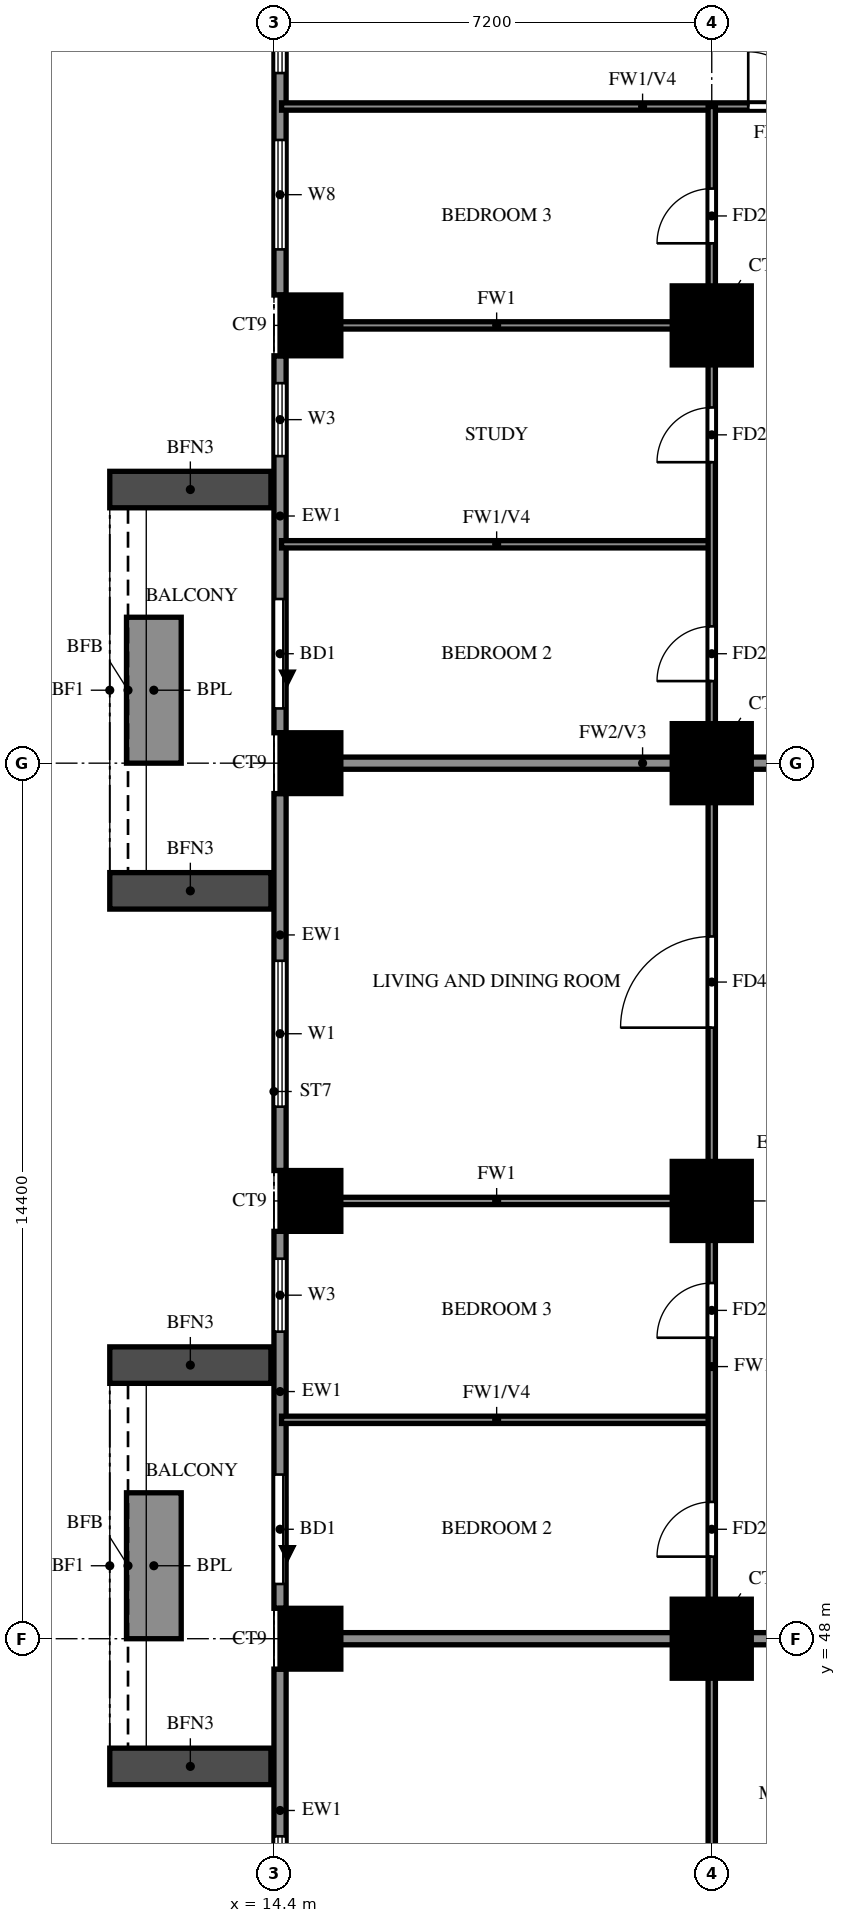
"""IFC4 building model, lengths in metres.
Left out: names, types, materials, properties, quantities, classifications, styles, units other than length and angle.
Written with IfcOpenShell. Run it as: python <this file> out.ifc"""

import sys

from ifc_helpers import new_model, si_unit, direction, frame, frame_2d, origin, origin_2d, place, context, subcontext, project, spatial, rectangle, extrude, source, transform, mapped, element, fill, save


model = new_model("IFC4")
c1 = context("Model", 3, precision=1e-05, world=origin(), true_north=direction((0.0, 1.0)))
c2 = subcontext(c1, "Body", "Model", "MODEL_VIEW")
j1 = project(units=[si_unit("LENGTHUNIT", "METRE"), si_unit("PLANEANGLEUNIT", "RADIAN")], contexts=[c1])
p1 = place(None, origin())
s1 = spatial("IfcSite", under=j1, at=p1, CompositionType="ELEMENT")
p2 = place(p1, origin())
s2 = spatial("IfcBuilding", under=s1, at=p2, CompositionType="ELEMENT")
p3 = place(p2, frame((0.0, 0.0, 62.0)))
s3 = spatial("IfcBuildingStorey", under=s2, at=p3, CompositionType="ELEMENT", Elevation=62.0)
m1 = source(origin(), c2, "Body", "SweptSolid", [
    extrude(rectangle(XDim=1.0, YDim=1.0, at=origin_2d()), origin(), (0.0, 0.0, 1.0), 3.18),
])
p4 = place(p3, frame((15.0, 48.0, 0.0), z_axis=(0.0, 0.0, 1.0), x_axis=(1.0, 0.0, 0.0)))
e1 = element("IfcColumn", 1, at=p4, inside=s3, PredefinedType="COLUMN", context=c2, shape_type="MappedRepresentation", body=[
    mapped(m1, transform((0.0, 0.0, 0.0))),
])
m2 = source(origin(), c2, "Body", "SweptSolid", [
    extrude(rectangle(XDim=1.3, YDim=1.3, at=origin_2d()), origin(), (0.0, 0.0, 1.0), 3.18),
])
p5 = place(p3, frame((21.6, 48.0, 0.0), z_axis=(0.0, 0.0, 1.0), x_axis=(1.0, 0.0, 0.0)))
e2 = element("IfcColumn", 2, at=p5, inside=s3, PredefinedType="COLUMN", context=c2, shape_type="MappedRepresentation", body=[
    mapped(m2, transform((0.0, 0.0, 0.0))),
])
p6 = place(p3, frame((15.0, 55.2, 0.0), z_axis=(0.0, 0.0, 1.0), x_axis=(1.0, 0.0, 0.0)))
e3 = element("IfcColumn", 3, at=p6, inside=s3, PredefinedType="COLUMN", context=c2, shape_type="MappedRepresentation", body=[
    mapped(m1, transform((0.0, 0.0, 0.0))),
])
p7 = place(p3, frame((21.6, 55.2, 0.0), z_axis=(0.0, 0.0, 1.0), x_axis=(1.0, 0.0, 0.0)))
e4 = element("IfcColumn", 4, at=p7, inside=s3, PredefinedType="COLUMN", context=c2, shape_type="MappedRepresentation", body=[
    mapped(m2, transform((0.0, 0.0, 0.0))),
])
p8 = place(p3, frame((15.0, 62.4, 0.0), z_axis=(0.0, 0.0, 1.0), x_axis=(1.0, 0.0, 0.0)))
e5 = element("IfcColumn", 5, at=p8, inside=s3, PredefinedType="COLUMN", context=c2, shape_type="MappedRepresentation", body=[
    mapped(m1, transform((0.0, 0.0, 0.0))),
])
p9 = place(p3, frame((21.6, 62.4, 0.0), z_axis=(0.0, 0.0, 1.0), x_axis=(1.0, 0.0, 0.0)))
e6 = element("IfcColumn", 6, at=p9, inside=s3, PredefinedType="COLUMN", context=c2, shape_type="MappedRepresentation", body=[
    mapped(m2, transform((0.0, 0.0, 0.0))),
])
p10 = place(p3, frame((15.0, 69.6, 0.0), z_axis=(0.0, 0.0, 1.0), x_axis=(1.0, 0.0, 0.0)))
e7 = element("IfcColumn", 7, at=p10, inside=s3, PredefinedType="COLUMN", context=c2, shape_type="MappedRepresentation", body=[
    mapped(m1, transform((0.0, 0.0, 0.0))),
])
p11 = place(p3, frame((21.6, 69.6, 0.0), z_axis=(0.0, 0.0, 1.0), x_axis=(1.0, 0.0, 0.0)))
e8 = element("IfcColumn", 8, at=p11, inside=s3, PredefinedType="COLUMN", context=c2, shape_type="MappedRepresentation", body=[
    mapped(m2, transform((0.0, 0.0, 0.0))),
])
p12 = place(p3, frame((14.5, 76.3, 0.0), z_axis=(0.0, 0.0, 1.0), x_axis=(0.0, -1.0, 0.0)))
e9 = element("IfcWall", 9, at=p12, inside=s3, PredefinedType="SOLIDWALL", context=c2, shape_type="SweptSolid", body=[
    extrude(rectangle(XDim=6.2, YDim=0.2, at=frame_2d((3.1, 0.0))), origin(), (0.0, 0.0, 1.0), 3.18),
])
p13 = place(p12, frame((3.65, 0.0, 0.6)))
e10 = element("IfcOpeningElement", 10, at=p13, cuts=e9, PredefinedType="OPENING", context=c2, shape_type="SweptSolid", body=[
    extrude(rectangle(XDim=1.8, YDim=2.4, at=frame_2d((0.9, 1.2))), frame((0.0, 0.11, 0.0), z_axis=(0.0, -1.0, 0.0), x_axis=(1.0, 0.0, 0.0)), (0.0, 0.0, 1.0), 0.22),
])
p14 = place(p12, frame((0.75, 0.0, 0.6)))
e11 = element("IfcOpeningElement", 11, at=p14, cuts=e9, PredefinedType="OPENING", context=c2, shape_type="SweptSolid", body=[
    extrude(rectangle(XDim=1.8, YDim=2.4, at=frame_2d((0.9, 1.2))), frame((0.0, 0.11, 0.0), z_axis=(0.0, -1.0, 0.0), x_axis=(1.0, 0.0, 0.0)), (0.0, 0.0, 1.0), 0.22),
])
p15 = place(p3, frame((14.5, 69.1, 0.0), z_axis=(0.0, 0.0, 1.0), x_axis=(0.0, -1.0, 0.0)))
e12 = element("IfcWall", 12, at=p15, inside=s3, PredefinedType="SOLIDWALL", context=c2, shape_type="SweptSolid", body=[
    extrude(rectangle(XDim=6.2, YDim=0.2, at=frame_2d((3.1, 0.0))), origin(), (0.0, 0.0, 1.0), 3.18),
])
p16 = place(p15, frame((4.0, 0.0, 0.0)))
e13 = element("IfcOpeningElement", 13, at=p16, cuts=e12, PredefinedType="OPENING", context=c2, shape_type="SweptSolid", body=[
    extrude(rectangle(XDim=1.8, YDim=2.4, at=frame_2d((0.9, 1.2))), frame((0.0, 0.11, 0.0), z_axis=(0.0, -1.0, 0.0), x_axis=(1.0, 0.0, 0.0)), (0.0, 0.0, 1.0), 0.22),
])
p17 = place(p15, frame((0.45, 0.0, 0.6)))
e14 = element("IfcOpeningElement", 14, at=p17, cuts=e12, PredefinedType="OPENING", context=c2, shape_type="SweptSolid", body=[
    extrude(rectangle(XDim=1.2, YDim=2.4, at=frame_2d((0.6, 1.2))), frame((0.0, 0.11, 0.0), z_axis=(0.0, -1.0, 0.0), x_axis=(1.0, 0.0, 0.0)), (0.0, 0.0, 1.0), 0.22),
])
p18 = place(p3, frame((14.5, 61.9, 0.0), z_axis=(0.0, 0.0, 1.0), x_axis=(0.0, -1.0, 0.0)))
e15 = element("IfcWall", 15, at=p18, inside=s3, PredefinedType="SOLIDWALL", context=c2, shape_type="SweptSolid", body=[
    extrude(rectangle(XDim=6.2, YDim=0.2, at=frame_2d((3.1, 0.0))), origin(), (0.0, 0.0, 1.0), 3.18),
])
p19 = place(p18, frame((2.75, 0.0, 0.6)))
e16 = element("IfcOpeningElement", 16, at=p19, cuts=e15, PredefinedType="OPENING", context=c2, shape_type="SweptSolid", body=[
    extrude(rectangle(XDim=2.4, YDim=2.4, at=frame_2d((1.2, 1.2))), frame((0.0, 0.11, 0.0), z_axis=(0.0, -1.0, 0.0), x_axis=(1.0, 0.0, 0.0)), (0.0, 0.0, 1.0), 0.22),
])
p20 = place(p3, frame((14.5, 54.7, 0.0), z_axis=(0.0, 0.0, 1.0), x_axis=(0.0, -1.0, 0.0)))
e17 = element("IfcWall", 17, at=p20, inside=s3, PredefinedType="SOLIDWALL", context=c2, shape_type="SweptSolid", body=[
    extrude(rectangle(XDim=6.2, YDim=0.2, at=frame_2d((3.1, 0.0))), origin(), (0.0, 0.0, 1.0), 3.18),
])
p21 = place(p20, frame((4.0, 0.0, 0.0)))
e18 = element("IfcOpeningElement", 18, at=p21, cuts=e17, PredefinedType="OPENING", context=c2, shape_type="SweptSolid", body=[
    extrude(rectangle(XDim=1.8, YDim=2.4, at=frame_2d((0.9, 1.2))), frame((0.0, 0.11, 0.0), z_axis=(0.0, -1.0, 0.0), x_axis=(1.0, 0.0, 0.0)), (0.0, 0.0, 1.0), 0.22),
])
p22 = place(p20, frame((0.45, 0.0, 0.6)))
e19 = element("IfcOpeningElement", 19, at=p22, cuts=e17, PredefinedType="OPENING", context=c2, shape_type="SweptSolid", body=[
    extrude(rectangle(XDim=1.2, YDim=2.4, at=frame_2d((0.6, 1.2))), frame((0.0, 0.11, 0.0), z_axis=(0.0, -1.0, 0.0), x_axis=(1.0, 0.0, 0.0)), (0.0, 0.0, 1.0), 0.22),
])
p23 = place(p3, frame((14.5, 47.5, 0.0), z_axis=(0.0, 0.0, 1.0), x_axis=(0.0, -1.0, 0.0)))
e20 = element("IfcWall", 20, at=p23, inside=s3, PredefinedType="SOLIDWALL", context=c2, shape_type="SweptSolid", body=[
    extrude(rectangle(XDim=6.2, YDim=0.2, at=frame_2d((3.1, 0.0))), origin(), (0.0, 0.0, 1.0), 3.18),
])
p24 = place(p23, frame((2.75, 0.0, 0.6)))
e21 = element("IfcOpeningElement", 21, at=p24, cuts=e20, PredefinedType="OPENING", context=c2, shape_type="SweptSolid", body=[
    extrude(rectangle(XDim=2.4, YDim=2.4, at=frame_2d((1.2, 1.2))), frame((0.0, 0.11, 0.0), z_axis=(0.0, -1.0, 0.0), x_axis=(1.0, 0.0, 0.0)), (0.0, 0.0, 1.0), 0.22),
])
for number, where, z_axis, x_axis in (
    (22, (14.35, 66.9, 0.0), (0.0, 0.0, 1.0), (-1.0, 0.0, 0.0)),
    (23, (14.35, 60.3, 0.0), (0.0, 0.0, 1.0), (-1.0, 0.0, 0.0)),
):
    element("IfcWall", number, at=place(p3, frame(where, z_axis=z_axis, x_axis=x_axis)), inside=s3, PredefinedType="SOLIDWALL", context=c2, shape_type="SweptSolid", body=[
        extrude(rectangle(XDim=2.65, YDim=0.6, at=frame_2d((1.325, 0.0))), origin(), (0.0, 0.0, 1.0), 2.85),
    ])
p25 = place(p3, frame((12.425, 64.8, 0.0), z_axis=(0.0, 0.0, 1.0), x_axis=(0.0, -1.0, 0.0)))
e24 = element("IfcWall", 24, at=p25, inside=s3, PredefinedType="SOLIDWALL", context=c2, shape_type="SweptSolid", body=[
    extrude(rectangle(XDim=2.4, YDim=0.9, at=frame_2d((1.2, 0.0))), origin(), (0.0, 0.0, 1.0), 0.9),
])
for number, where, z_axis, x_axis in (
    (25, (14.35, 52.5, 0.0), (0.0, 0.0, 1.0), (-1.0, 0.0, 0.0)),
    (26, (14.35, 45.9, 0.0), (0.0, 0.0, 1.0), (-1.0, 0.0, 0.0)),
):
    element("IfcWall", number, at=place(p3, frame(where, z_axis=z_axis, x_axis=x_axis)), inside=s3, PredefinedType="SOLIDWALL", context=c2, shape_type="SweptSolid", body=[
        extrude(rectangle(XDim=2.65, YDim=0.6, at=frame_2d((1.325, 0.0))), origin(), (0.0, 0.0, 1.0), 2.85),
    ])
p26 = place(p3, frame((12.425, 50.4, 0.0), z_axis=(0.0, 0.0, 1.0), x_axis=(0.0, -1.0, 0.0)))
e27 = element("IfcWall", 27, at=p26, inside=s3, PredefinedType="SOLIDWALL", context=c2, shape_type="SweptSolid", body=[
    extrude(rectangle(XDim=2.4, YDim=0.9, at=frame_2d((1.2, 0.0))), origin(), (0.0, 0.0, 1.0), 0.9),
])
p27 = place(p3, frame((14.525, 48.0, 0.0), z_axis=(0.0, 0.0, 1.0), x_axis=(1.0, 0.0, 0.0)))
e28 = element("IfcWall", 28, at=p27, inside=s3, PredefinedType="SOLIDWALL", context=c2, shape_type="SweptSolid", body=[
    extrude(rectangle(XDim=19.075, YDim=0.2, at=frame_2d((9.538, 0.0))), origin(), (0.0, 0.0, 1.0), 3.18),
])
p28 = place(p3, frame((14.525, 62.4, 0.0), z_axis=(0.0, 0.0, 1.0), x_axis=(1.0, 0.0, 0.0)))
e29 = element("IfcWall", 29, at=p28, inside=s3, PredefinedType="SOLIDWALL", context=c2, shape_type="SweptSolid", body=[
    extrude(rectangle(XDim=11.875, YDim=0.2, at=frame_2d((5.938, 0.0))), origin(), (0.0, 0.0, 1.0), 3.18),
])
p29 = place(p3, frame((14.525, 51.6, 0.0), z_axis=(0.0, 0.0, 1.0), x_axis=(1.0, 0.0, 0.0)))
e30 = element("IfcWall", 30, at=p29, inside=s3, PredefinedType="PARTITIONING", context=c2, shape_type="SweptSolid", body=[
    extrude(rectangle(XDim=7.075, YDim=0.12, at=frame_2d((3.538, 0.0))), origin(), (0.0, 0.0, 1.0), 2.28),
])
p30 = place(p3, frame((14.525, 55.2, 0.0), z_axis=(0.0, 0.0, 1.0), x_axis=(1.0, 0.0, 0.0)))
e31 = element("IfcWall", 31, at=p30, inside=s3, PredefinedType="PARTITIONING", context=c2, shape_type="SweptSolid", body=[
    extrude(rectangle(XDim=7.075, YDim=0.12, at=frame_2d((3.538, 0.0))), origin(), (0.0, 0.0, 1.0), 3.18),
])
p31 = place(p3, frame((14.525, 66.0, 0.0), z_axis=(0.0, 0.0, 1.0), x_axis=(1.0, 0.0, 0.0)))
e32 = element("IfcWall", 32, at=p31, inside=s3, PredefinedType="PARTITIONING", context=c2, shape_type="SweptSolid", body=[
    extrude(rectangle(XDim=7.075, YDim=0.12, at=frame_2d((3.538, 0.0))), origin(), (0.0, 0.0, 1.0), 2.28),
])
p32 = place(p3, frame((14.525, 69.6, 0.0), z_axis=(0.0, 0.0, 1.0), x_axis=(1.0, 0.0, 0.0)))
e33 = element("IfcWall", 33, at=p32, inside=s3, PredefinedType="PARTITIONING", context=c2, shape_type="SweptSolid", body=[
    extrude(rectangle(XDim=7.075, YDim=0.12, at=frame_2d((3.538, 0.0))), origin(), (0.0, 0.0, 1.0), 3.18),
])
p33 = place(p3, frame((14.525, 73.2, 0.0), z_axis=(0.0, 0.0, 1.0), x_axis=(1.0, 0.0, 0.0)))
e34 = element("IfcWall", 34, at=p33, inside=s3, PredefinedType="PARTITIONING", context=c2, shape_type="SweptSolid", body=[
    extrude(rectangle(XDim=11.875, YDim=0.12, at=frame_2d((5.938, 0.0))), origin(), (0.0, 0.0, 1.0), 2.28),
])
p34 = place(p33, frame((7.675, 0.0, 0.0)))
e35 = element("IfcOpeningElement", 35, at=p34, cuts=e34, PredefinedType="OPENING", context=c2, shape_type="SweptSolid", body=[
    extrude(rectangle(XDim=0.9, YDim=2.1, at=frame_2d((0.45, 1.05))), frame((0.0, 0.07, 0.0), z_axis=(0.0, -1.0, 0.0), x_axis=(1.0, 0.0, 0.0)), (0.0, 0.0, 1.0), 0.14),
])
p35 = place(p3, frame((21.6, 33.725, 0.0), z_axis=(0.0, 0.0, 1.0), x_axis=(0.0, 1.0, 0.0)))
e36 = element("IfcWall", 36, at=p35, inside=s3, PredefinedType="PARTITIONING", context=c2, shape_type="SweptSolid", body=[
    extrude(rectangle(XDim=39.475, YDim=0.12, at=frame_2d((19.737, 0.0))), origin(), (0.0, 0.0, 1.0), 3.18),
])
p36 = place(p35, frame((7.775, 0.0, 0.0)))
e37 = element("IfcOpeningElement", 37, at=p36, cuts=e36, PredefinedType="OPENING", context=c2, shape_type="SweptSolid", body=[
    extrude(rectangle(XDim=0.9, YDim=2.1, at=frame_2d((0.45, 1.05))), frame((0.0, 0.07, 0.0), z_axis=(0.0, -1.0, 0.0), x_axis=(1.0, 0.0, 0.0)), (0.0, 0.0, 1.0), 0.14),
])
p37 = place(p35, frame((15.625, 0.0, 0.0)))
e38 = element("IfcOpeningElement", 38, at=p37, cuts=e36, PredefinedType="OPENING", context=c2, shape_type="SweptSolid", body=[
    extrude(rectangle(XDim=0.9, YDim=2.1, at=frame_2d((0.45, 1.05))), frame((0.0, 0.07, 0.0), z_axis=(0.0, -1.0, 0.0), x_axis=(1.0, 0.0, 0.0)), (0.0, 0.0, 1.0), 0.14),
])
p38 = place(p35, frame((19.225, 0.0, 0.0)))
e39 = element("IfcOpeningElement", 39, at=p38, cuts=e36, PredefinedType="OPENING", context=c2, shape_type="SweptSolid", body=[
    extrude(rectangle(XDim=0.9, YDim=2.1, at=frame_2d((0.45, 1.05))), frame((0.0, 0.07, 0.0), z_axis=(0.0, -1.0, 0.0), x_axis=(1.0, 0.0, 0.0)), (0.0, 0.0, 1.0), 0.14),
])
p39 = place(p35, frame((24.325, 0.0, 0.0)))
e40 = element("IfcOpeningElement", 40, at=p39, cuts=e36, PredefinedType="OPENING", context=c2, shape_type="SweptSolid", body=[
    extrude(rectangle(XDim=1.5, YDim=2.1, at=frame_2d((0.75, 1.05))), frame((0.0, 0.07, 0.0), z_axis=(0.0, -1.0, 0.0), x_axis=(1.0, 0.0, 0.0)), (0.0, 0.0, 1.0), 0.14),
])
p40 = place(p35, frame((30.025, 0.0, 0.0)))
e41 = element("IfcOpeningElement", 41, at=p40, cuts=e36, PredefinedType="OPENING", context=c2, shape_type="SweptSolid", body=[
    extrude(rectangle(XDim=0.9, YDim=2.1, at=frame_2d((0.45, 1.05))), frame((0.0, 0.07, 0.0), z_axis=(0.0, -1.0, 0.0), x_axis=(1.0, 0.0, 0.0)), (0.0, 0.0, 1.0), 0.14),
])
p41 = place(p35, frame((33.625, 0.0, 0.0)))
e42 = element("IfcOpeningElement", 42, at=p41, cuts=e36, PredefinedType="OPENING", context=c2, shape_type="SweptSolid", body=[
    extrude(rectangle(XDim=0.9, YDim=2.1, at=frame_2d((0.45, 1.05))), frame((0.0, 0.07, 0.0), z_axis=(0.0, -1.0, 0.0), x_axis=(1.0, 0.0, 0.0)), (0.0, 0.0, 1.0), 0.14),
])
p42 = place(p35, frame((37.225, 0.0, 0.0)))
e43 = element("IfcOpeningElement", 43, at=p42, cuts=e36, PredefinedType="OPENING", context=c2, shape_type="SweptSolid", body=[
    extrude(rectangle(XDim=0.9, YDim=2.1, at=frame_2d((0.45, 1.05))), frame((0.0, 0.07, 0.0), z_axis=(0.0, -1.0, 0.0), x_axis=(1.0, 0.0, 0.0)), (0.0, 0.0, 1.0), 0.14),
])
p43 = place(p13, origin())
e44 = element("IfcWindow", 44, at=p43, inside=s3, PartitioningType="DOUBLE_PANEL_VERTICAL", PredefinedType="WINDOW", context=c2, shape_type="SweptSolid", body=[
    extrude(rectangle(XDim=1.8, YDim=2.4, at=frame_2d((0.9, 1.2))), frame((0.0, 0.03, 0.0), z_axis=(0.0, -1.0, 0.0), x_axis=(1.0, 0.0, 0.0)), (0.0, 0.0, 1.0), 0.06),
])
fill(e10, e44)
p44 = place(p14, origin())
e45 = element("IfcWindow", 45, at=p44, inside=s3, PartitioningType="DOUBLE_PANEL_VERTICAL", PredefinedType="WINDOW", context=c2, shape_type="SweptSolid", body=[
    extrude(rectangle(XDim=1.8, YDim=2.4, at=frame_2d((0.9, 1.2))), frame((0.0, 0.03, 0.0), z_axis=(0.0, -1.0, 0.0), x_axis=(1.0, 0.0, 0.0)), (0.0, 0.0, 1.0), 0.06),
])
fill(e11, e45)
p45 = place(p16, origin())
e46 = element("IfcDoor", 46, at=p45, inside=s3, OperationType="DOUBLE_DOOR_SLIDING", PredefinedType="DOOR", context=c2, shape_type="SweptSolid", body=[
    extrude(rectangle(XDim=1.8, YDim=2.4, at=frame_2d((0.9, 1.2))), frame((0.0, 0.025, 0.0), z_axis=(0.0, -1.0, 0.0), x_axis=(1.0, 0.0, 0.0)), (0.0, 0.0, 1.0), 0.05),
])
fill(e13, e46)
p46 = place(p17, origin())
e47 = element("IfcWindow", 47, at=p46, inside=s3, PartitioningType="SINGLE_PANEL", PredefinedType="WINDOW", context=c2, shape_type="SweptSolid", body=[
    extrude(rectangle(XDim=1.2, YDim=2.4, at=frame_2d((0.6, 1.2))), frame((0.0, 0.03, 0.0), z_axis=(0.0, -1.0, 0.0), x_axis=(1.0, 0.0, 0.0)), (0.0, 0.0, 1.0), 0.06),
])
fill(e14, e47)
p47 = place(p19, origin())
e48 = element("IfcWindow", 48, at=p47, inside=s3, PartitioningType="DOUBLE_PANEL_VERTICAL", PredefinedType="WINDOW", context=c2, shape_type="SweptSolid", body=[
    extrude(rectangle(XDim=2.4, YDim=2.4, at=frame_2d((1.2, 1.2))), frame((0.0, 0.03, 0.0), z_axis=(0.0, -1.0, 0.0), x_axis=(1.0, 0.0, 0.0)), (0.0, 0.0, 1.0), 0.06),
])
fill(e16, e48)
p48 = place(p21, origin())
e49 = element("IfcDoor", 49, at=p48, inside=s3, OperationType="DOUBLE_DOOR_SLIDING", PredefinedType="DOOR", context=c2, shape_type="SweptSolid", body=[
    extrude(rectangle(XDim=1.8, YDim=2.4, at=frame_2d((0.9, 1.2))), frame((0.0, 0.025, 0.0), z_axis=(0.0, -1.0, 0.0), x_axis=(1.0, 0.0, 0.0)), (0.0, 0.0, 1.0), 0.05),
])
fill(e18, e49)
p49 = place(p22, origin())
e50 = element("IfcWindow", 50, at=p49, inside=s3, PartitioningType="SINGLE_PANEL", PredefinedType="WINDOW", context=c2, shape_type="SweptSolid", body=[
    extrude(rectangle(XDim=1.2, YDim=2.4, at=frame_2d((0.6, 1.2))), frame((0.0, 0.03, 0.0), z_axis=(0.0, -1.0, 0.0), x_axis=(1.0, 0.0, 0.0)), (0.0, 0.0, 1.0), 0.06),
])
fill(e19, e50)
p50 = place(p24, origin())
e51 = element("IfcWindow", 51, at=p50, inside=s3, PartitioningType="DOUBLE_PANEL_VERTICAL", PredefinedType="WINDOW", context=c2, shape_type="SweptSolid", body=[
    extrude(rectangle(XDim=2.4, YDim=2.4, at=frame_2d((1.2, 1.2))), frame((0.0, 0.03, 0.0), z_axis=(0.0, -1.0, 0.0), x_axis=(1.0, 0.0, 0.0)), (0.0, 0.0, 1.0), 0.06),
])
fill(e21, e51)
p51 = place(p37, origin())
e52 = element("IfcDoor", 52, at=p51, inside=s3, OperationType="SINGLE_SWING_RIGHT", PredefinedType="DOOR", context=c2, shape_type="SweptSolid", body=[
    extrude(rectangle(XDim=0.9, YDim=2.1, at=frame_2d((0.45, 1.05))), frame((0.0, 0.025, 0.0), z_axis=(0.0, -1.0, 0.0), x_axis=(1.0, 0.0, 0.0)), (0.0, 0.0, 1.0), 0.05),
])
fill(e38, e52)
p52 = place(p38, origin())
e53 = element("IfcDoor", 53, at=p52, inside=s3, OperationType="SINGLE_SWING_LEFT", PredefinedType="DOOR", context=c2, shape_type="SweptSolid", body=[
    extrude(rectangle(XDim=0.9, YDim=2.1, at=frame_2d((0.45, 1.05))), frame((0.0, 0.025, 0.0), z_axis=(0.0, -1.0, 0.0), x_axis=(1.0, 0.0, 0.0)), (0.0, 0.0, 1.0), 0.05),
])
fill(e39, e53)
p53 = place(p39, origin())
e54 = element("IfcDoor", 54, at=p53, inside=s3, OperationType="SINGLE_SWING_LEFT", PredefinedType="DOOR", context=c2, shape_type="SweptSolid", body=[
    extrude(rectangle(XDim=1.5, YDim=2.1, at=frame_2d((0.75, 1.05))), frame((0.0, 0.025, 0.0), z_axis=(0.0, -1.0, 0.0), x_axis=(1.0, 0.0, 0.0)), (0.0, 0.0, 1.0), 0.05),
])
fill(e40, e54)
p54 = place(p40, origin())
e55 = element("IfcDoor", 55, at=p54, inside=s3, OperationType="SINGLE_SWING_RIGHT", PredefinedType="DOOR", context=c2, shape_type="SweptSolid", body=[
    extrude(rectangle(XDim=0.9, YDim=2.1, at=frame_2d((0.45, 1.05))), frame((0.0, 0.025, 0.0), z_axis=(0.0, -1.0, 0.0), x_axis=(1.0, 0.0, 0.0)), (0.0, 0.0, 1.0), 0.05),
])
fill(e41, e55)
p55 = place(p41, origin())
e56 = element("IfcDoor", 56, at=p55, inside=s3, OperationType="SINGLE_SWING_LEFT", PredefinedType="DOOR", context=c2, shape_type="SweptSolid", body=[
    extrude(rectangle(XDim=0.9, YDim=2.1, at=frame_2d((0.45, 1.05))), frame((0.0, 0.025, 0.0), z_axis=(0.0, -1.0, 0.0), x_axis=(1.0, 0.0, 0.0)), (0.0, 0.0, 1.0), 0.05),
])
fill(e42, e56)
p56 = place(p42, origin())
e57 = element("IfcDoor", 57, at=p56, inside=s3, OperationType="SINGLE_SWING_LEFT", PredefinedType="DOOR", context=c2, shape_type="SweptSolid", body=[
    extrude(rectangle(XDim=0.9, YDim=2.1, at=frame_2d((0.45, 1.05))), frame((0.0, 0.025, 0.0), z_axis=(0.0, -1.0, 0.0), x_axis=(1.0, 0.0, 0.0)), (0.0, 0.0, 1.0), 0.05),
])
fill(e43, e57)
p57 = place(p34, origin())
e58 = element("IfcDoor", 58, at=p57, inside=s3, OperationType="SINGLE_SWING_RIGHT", PredefinedType="DOOR", context=c2, shape_type="SweptSolid", body=[
    extrude(rectangle(XDim=0.9, YDim=2.1, at=frame_2d((0.45, 1.05))), frame((0.0, 0.025, 0.0), z_axis=(0.0, -1.0, 0.0), x_axis=(1.0, 0.0, 0.0)), (0.0, 0.0, 1.0), 0.05),
])
fill(e35, e58)
save(model, sys.argv[1])
